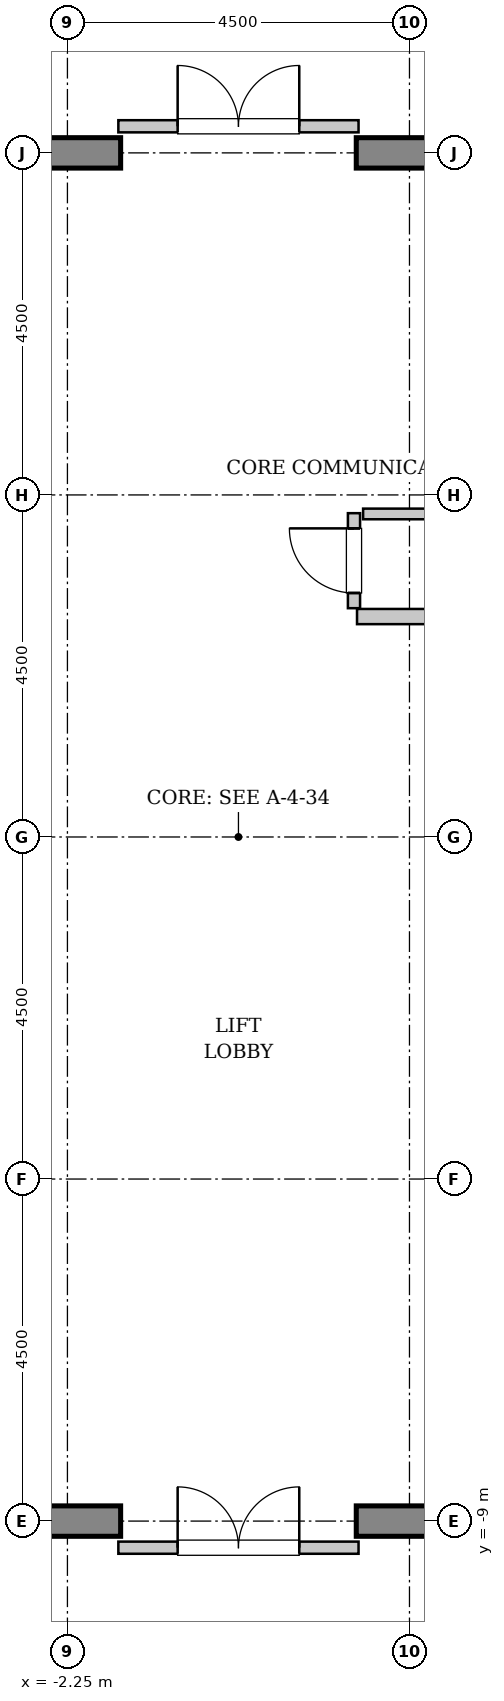
"""IFC4 building model, lengths in metres.
Left out: names, types, materials, properties, quantities, classifications, styles, units other than length and angle.
Written with IfcOpenShell. Run it as: python <this file> out.ifc"""

import sys

from ifc_helpers import new_model, si_unit, direction, frame, frame_2d, origin, place, context, subcontext, project, spatial, rectangle, extrude, source, transform, mapped, element, fill, save


model = new_model("IFC4")
c1 = context("Model", 3, precision=1e-05, world=origin(), true_north=direction((0.0, 1.0)))
c2 = subcontext(c1, "Body", "Model", "MODEL_VIEW")
j1 = project(units=[si_unit("LENGTHUNIT", "METRE"), si_unit("PLANEANGLEUNIT", "RADIAN")], contexts=[c1])
p1 = place(None, origin())
s1 = spatial("IfcSite", under=j1, at=p1, CompositionType="ELEMENT")
p2 = place(p1, origin())
s2 = spatial("IfcBuilding", under=s1, at=p2, CompositionType="ELEMENT")
p3 = place(p2, frame((0.0, 0.0, 363.0)))
s3 = spatial("IfcBuildingStorey", under=s2, at=p3, CompositionType="ELEMENT", Elevation=363.0)
m1 = source(origin(), c2, "Body", "SweptSolid", [
    extrude(rectangle(XDim=9.9, YDim=0.4, at=frame_2d((4.95, 0.0))), origin(), (0.0, 0.0, 1.0), 4.4),
])
for number, where, z_axis, x_axis in (
    (1, (-11.45, 9.0, 0.0), (0.0, 0.0, 1.0), (1.0, 0.0, 0.0)),
    (2, (1.55, 9.0, 0.0), (0.0, 0.0, 1.0), (1.0, 0.0, 0.0)),
    (3, (-11.45, -9.0, 0.0), (0.0, 0.0, 1.0), (1.0, 0.0, 0.0)),
    (4, (1.55, -9.0, 0.0), (0.0, 0.0, 1.0), (1.0, 0.0, 0.0)),
):
    element("IfcWall", number, at=place(p3, frame(where, z_axis=z_axis, x_axis=x_axis)), inside=s3, PredefinedType="SHEAR", context=c2, shape_type="MappedRepresentation", body=[
        mapped(m1, transform((0.0, 0.0, 0.0), x_axis=(1.0, 0.0, 0.0), y_axis=(0.0, 1.0, 0.0), z_axis=(0.0, 0.0, 1.0), scale=1.0)),
    ])
m2 = source(origin(), c2, "Body", "SweptSolid", [
    extrude(rectangle(XDim=2.52, YDim=0.2, at=frame_2d((1.26, 0.0))), origin(), (0.0, 0.0, 1.0), 4.085),
])
p4 = place(p3, frame((1.56, 2.9, 0.0), z_axis=(0.0, 0.0, 1.0), x_axis=(1.0, 0.0, 0.0)))
e5 = element("IfcWall", 5, at=p4, inside=s3, PredefinedType="PARTITIONING", context=c2, shape_type="MappedRepresentation", body=[
    mapped(m2, transform((0.0, 0.0, 0.0), x_axis=(1.0, 0.0, 0.0), y_axis=(0.0, 1.0, 0.0), z_axis=(0.0, 0.0, 1.0), scale=1.0)),
])
m3 = source(origin(), c2, "Body", "SweptSolid", [
    extrude(rectangle(XDim=3.16, YDim=0.16, at=frame_2d((1.58, 0.0))), origin(), (0.0, 0.0, 1.0), 3.175),
])
p5 = place(p3, frame((-1.58, 9.35, 0.0), z_axis=(0.0, 0.0, 1.0), x_axis=(1.0, 0.0, 0.0)))
e6 = element("IfcWall", 6, at=p5, inside=s3, PredefinedType="PARTITIONING", context=c2, shape_type="MappedRepresentation", body=[
    mapped(m3, transform((0.0, 0.0, 0.0), x_axis=(1.0, 0.0, 0.0), y_axis=(0.0, 1.0, 0.0), z_axis=(0.0, 0.0, 1.0), scale=1.0)),
])
p6 = place(p5, frame((0.78, 0.0, 0.0)))
e7 = element("IfcOpeningElement", 7, at=p6, cuts=e6, PredefinedType="OPENING", context=c2, shape_type="SweptSolid", body=[
    extrude(rectangle(XDim=1.6, YDim=2.3, at=frame_2d((0.8, 1.15))), frame((0.0, 0.09, 0.0), z_axis=(0.0, -1.0, 0.0), x_axis=(1.0, 0.0, 0.0)), (0.0, 0.0, 1.0), 0.18),
])
p7 = place(p3, frame((-1.58, -9.35, 0.0), z_axis=(0.0, 0.0, 1.0), x_axis=(1.0, 0.0, 0.0)))
e8 = element("IfcWall", 8, at=p7, inside=s3, PredefinedType="PARTITIONING", context=c2, shape_type="MappedRepresentation", body=[
    mapped(m3, transform((0.0, 0.0, 0.0), x_axis=(1.0, 0.0, 0.0), y_axis=(0.0, 1.0, 0.0), z_axis=(0.0, 0.0, 1.0), scale=1.0)),
])
p8 = place(p7, frame((0.78, 0.0, 0.0)))
e9 = element("IfcOpeningElement", 9, at=p8, cuts=e8, PredefinedType="OPENING", context=c2, shape_type="SweptSolid", body=[
    extrude(rectangle(XDim=1.6, YDim=2.3, at=frame_2d((0.8, 1.15))), frame((0.0, 0.09, 0.0), z_axis=(0.0, -1.0, 0.0), x_axis=(1.0, 0.0, 0.0)), (0.0, 0.0, 1.0), 0.18),
])
m4 = source(origin(), c2, "Body", "SweptSolid", [
    extrude(rectangle(XDim=1.25, YDim=0.16, at=frame_2d((0.625, 0.0))), origin(), (0.0, 0.0, 1.0), 4.085),
])
p9 = place(p3, frame((1.52, 3.01, 0.0), z_axis=(0.0, 0.0, 1.0), x_axis=(0.0, 1.0, 0.0)))
e10 = element("IfcWall", 10, at=p9, inside=s3, PredefinedType="PARTITIONING", context=c2, shape_type="MappedRepresentation", body=[
    mapped(m4, transform((0.0, 0.0, 0.0), x_axis=(1.0, 0.0, 0.0), y_axis=(0.0, 1.0, 0.0), z_axis=(0.0, 0.0, 1.0), scale=1.0)),
])
p10 = place(p9, frame((0.2, 0.0, 0.0)))
e11 = element("IfcOpeningElement", 11, at=p10, cuts=e10, PredefinedType="OPENING", context=c2, shape_type="SweptSolid", body=[
    extrude(rectangle(XDim=0.85, YDim=2.1, at=frame_2d((0.425, 1.05))), frame((0.0, 0.09, 0.0), z_axis=(0.0, -1.0, 0.0), x_axis=(1.0, 0.0, 0.0)), (0.0, 0.0, 1.0), 0.18),
])
m5 = source(origin(), c2, "Body", "SweptSolid", [
    extrude(rectangle(XDim=3.15, YDim=0.14, at=frame_2d((1.575, 0.0))), origin(), (0.0, 0.0, 1.0), 4.085),
])
p11 = place(p3, frame((1.64, 4.25, 0.0), z_axis=(0.0, 0.0, 1.0), x_axis=(1.0, 0.0, 0.0)))
e12 = element("IfcWall", 12, at=p11, inside=s3, PredefinedType="PARTITIONING", context=c2, shape_type="MappedRepresentation", body=[
    mapped(m5, transform((0.0, 0.0, 0.0), x_axis=(1.0, 0.0, 0.0), y_axis=(0.0, 1.0, 0.0), z_axis=(0.0, 0.0, 1.0), scale=1.0)),
])
m6 = source(origin(), c2, "Body", "SweptSolid", [
    extrude(rectangle(XDim=1.6, YDim=2.3, at=frame_2d((0.8, 1.15))), frame((0.0, 0.025, 0.0), z_axis=(0.0, -1.0, 0.0), x_axis=(1.0, 0.0, 0.0)), (0.0, 0.0, 1.0), 0.05),
])
p12 = place(p6, origin())
e13 = element("IfcDoor", 13, at=p12, inside=s3, OperationType="DOUBLE_DOOR_SINGLE_SWING", PredefinedType="DOOR", context=c2, shape_type="MappedRepresentation", body=[
    mapped(m6, transform((0.0, 0.0, 0.0), x_axis=(1.0, 0.0, 0.0), y_axis=(0.0, 1.0, 0.0), z_axis=(0.0, 0.0, 1.0), scale=1.0)),
])
fill(e7, e13)
p13 = place(p8, origin())
e14 = element("IfcDoor", 14, at=p13, inside=s3, OperationType="DOUBLE_DOOR_SINGLE_SWING", PredefinedType="DOOR", context=c2, shape_type="MappedRepresentation", body=[
    mapped(m6, transform((0.0, 0.0, 0.0), x_axis=(1.0, 0.0, 0.0), y_axis=(0.0, 1.0, 0.0), z_axis=(0.0, 0.0, 1.0), scale=1.0)),
])
fill(e9, e14)
m7 = source(origin(), c2, "Body", "SweptSolid", [
    extrude(rectangle(XDim=0.85, YDim=2.1, at=frame_2d((0.425, 1.05))), frame((0.0, 0.025, 0.0), z_axis=(0.0, -1.0, 0.0), x_axis=(1.0, 0.0, 0.0)), (0.0, 0.0, 1.0), 0.05),
])
p14 = place(p10, origin())
e15 = element("IfcDoor", 15, at=p14, inside=s3, OperationType="SINGLE_SWING_RIGHT", PredefinedType="DOOR", context=c2, shape_type="MappedRepresentation", body=[
    mapped(m7, transform((0.0, 0.0, 0.0), x_axis=(1.0, 0.0, 0.0), y_axis=(0.0, 1.0, 0.0), z_axis=(0.0, 0.0, 1.0), scale=1.0)),
])
fill(e11, e15)
save(model, sys.argv[1])
